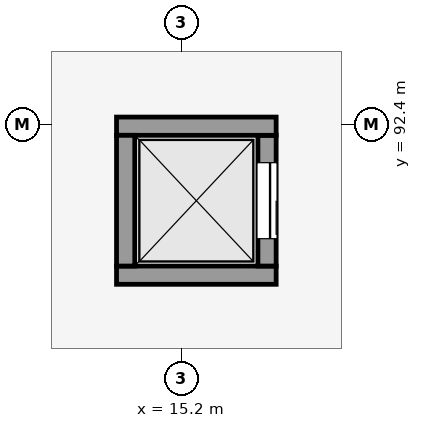
"""IFC4 building model, lengths in metres.
Left out: names, types, materials, properties, quantities, classifications, styles, units other than length and angle.
Written with IfcOpenShell. Run it as: python <this file> out.ifc"""

import sys

from ifc_helpers import new_model, si_unit, direction, frame, frame_2d, origin, place, context, subcontext, project, spatial, rectangle, extrude, element, fill, save


model = new_model("IFC4")
c1 = context("Model", 3, precision=1e-05, world=origin(), true_north=direction((0.0, 1.0)))
c2 = subcontext(c1, "Body", "Model", "MODEL_VIEW")
j1 = project(units=[si_unit("LENGTHUNIT", "METRE"), si_unit("PLANEANGLEUNIT", "RADIAN")], contexts=[c1])
p1 = place(None, origin())
s1 = spatial("IfcSite", under=j1, at=p1, CompositionType="ELEMENT")
p2 = place(p1, origin())
s2 = spatial("IfcBuilding", under=s1, at=p2, CompositionType="ELEMENT")
p3 = place(p2, frame((0.0, 0.0, 5.1)))
s3 = spatial("IfcBuildingStorey", under=s2, at=p3, CompositionType="ELEMENT", Elevation=5.1)
p4 = place(p3, frame((15.515, 94.768, 0.0), z_axis=(0.0, 0.0, 1.0), x_axis=(0.967930025072, -0.251219956541, 0.0)))
e1 = element("IfcWall", 1, at=p4, inside=s3, PredefinedType="SHEAR", context=c2, shape_type="SweptSolid", body=[
    extrude(rectangle(XDim=6.31, YDim=0.38, at=frame_2d((3.155, 0.0))), origin(), (0.0, 0.0, 1.0), 3.75),
])
p5 = place(p3, frame((16.45, 90.42, 0.0), z_axis=(0.0, 0.0, 1.0), x_axis=(-1.0, 0.0, 0.0)))
e2 = element("IfcWall", 2, at=p5, inside=s3, PredefinedType="SHEAR", context=c2, shape_type="SweptSolid", body=[
    extrude(rectangle(XDim=2.1, YDim=0.24, at=frame_2d((1.05, 0.0))), origin(), (0.0, 0.0, 1.0), 4.05),
])
p6 = place(p3, frame((16.33, 92.26, 0.0), z_axis=(0.0, 0.0, 1.0), x_axis=(0.0, -1.0, 0.0)))
e3 = element("IfcWall", 3, at=p6, inside=s3, PredefinedType="SHEAR", context=c2, shape_type="SweptSolid", body=[
    extrude(rectangle(XDim=1.72, YDim=0.24, at=frame_2d((0.86, 0.0))), origin(), (0.0, 0.0, 1.0), 4.05),
])
p7 = place(p6, frame((0.36, 0.0, 0.0)))
e4 = element("IfcOpeningElement", 4, at=p7, cuts=e3, PredefinedType="OPENING", context=c2, shape_type="SweptSolid", body=[
    extrude(rectangle(XDim=1.0, YDim=2.15, at=frame_2d((0.5, 1.075))), frame((0.0, 0.13, 0.0), z_axis=(0.0, -1.0, 0.0), x_axis=(1.0, 0.0, 0.0)), (0.0, 0.0, 1.0), 0.26),
])
p8 = place(p3, frame((14.35, 92.38, 0.0), z_axis=(0.0, 0.0, 1.0), x_axis=(1.0, 0.0, 0.0)))
e5 = element("IfcWall", 5, at=p8, inside=s3, PredefinedType="SHEAR", context=c2, shape_type="SweptSolid", body=[
    extrude(rectangle(XDim=2.1, YDim=0.24, at=frame_2d((1.05, 0.0))), origin(), (0.0, 0.0, 1.0), 4.05),
])
p9 = place(p3, frame((14.47, 90.54, 0.0), z_axis=(0.0, 0.0, 1.0), x_axis=(0.0, 1.0, 0.0)))
e6 = element("IfcWall", 6, at=p9, inside=s3, PredefinedType="SHEAR", context=c2, shape_type="SweptSolid", body=[
    extrude(rectangle(XDim=1.72, YDim=0.24, at=frame_2d((0.86, 0.0))), origin(), (0.0, 0.0, 1.0), 4.05),
])
p10 = place(p7, origin())
e7 = element("IfcDoor", 7, at=p10, inside=s3, OperationType="SLIDING_TO_RIGHT", PredefinedType="DOOR", context=c2, shape_type="SweptSolid", body=[
    extrude(rectangle(XDim=1.0, YDim=2.15, at=frame_2d((0.5, 1.075))), frame((0.0, 0.025, 0.0), z_axis=(0.0, -1.0, 0.0), x_axis=(1.0, 0.0, 0.0)), (0.0, 0.0, 1.0), 0.05),
])
fill(e4, e7)
save(model, sys.argv[1])
